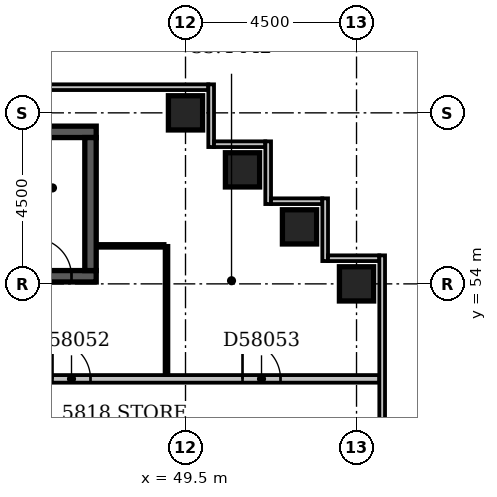
"""IFC4 building model, lengths in metres.
Left out: names, types, materials, properties, quantities, classifications, styles, units other than length and angle.
Written with IfcOpenShell. Run it as: python <this file> out.ifc"""

import sys

from ifc_helpers import new_model, si_unit, direction, frame, frame_2d, origin, origin_2d, place, context, subcontext, project, spatial, rectangle, extrude, element, fill, save


model = new_model("IFC4")
c1 = context("Model", 3, precision=1e-05, world=origin(), true_north=direction((0.0, 1.0)))
c2 = subcontext(c1, "Body", "Model", "MODEL_VIEW")
j1 = project(units=[si_unit("LENGTHUNIT", "METRE"), si_unit("PLANEANGLEUNIT", "RADIAN")], contexts=[c1])
p1 = place(None, origin())
s1 = spatial("IfcSite", under=j1, at=p1, CompositionType="ELEMENT")
p2 = place(p1, origin())
s2 = spatial("IfcBuilding", under=s1, at=p2, CompositionType="ELEMENT")
p3 = place(p2, frame((0.0, 0.0, 225.8)))
s3 = spatial("IfcBuildingStorey", under=s2, at=p3, CompositionType="ELEMENT", Elevation=225.8)
p4 = place(p3, frame((44.85, 54.2, -0.3), z_axis=(0.0, 0.0, 1.0), x_axis=(1.0, 0.0, 0.0)))
e1 = element("IfcWall", 1, at=p4, inside=s3, PredefinedType="SHEAR", context=c2, shape_type="SweptSolid", body=[
    extrude(rectangle(XDim=2.3, YDim=0.3, at=frame_2d((1.15, 0.0))), origin(), (0.0, 0.0, 1.0), 3.6),
])
p5 = place(p4, frame((0.65, 0.0, 0.3)))
e2 = element("IfcOpeningElement", 2, at=p5, cuts=e1, PredefinedType="OPENING", context=c2, shape_type="SweptSolid", body=[
    extrude(rectangle(XDim=1.0, YDim=2.1, at=frame_2d((0.5, 1.05))), frame((0.0, 0.162, 0.0), z_axis=(0.0, -1.0, 0.0), x_axis=(1.0, 0.0, 0.0)), (0.0, 0.0, 1.0), 0.324),
])
p6 = place(p3, frame((44.85, 58.0, -0.3), z_axis=(0.0, 0.0, 1.0), x_axis=(1.0, 0.0, 0.0)))
e3 = element("IfcWall", 3, at=p6, inside=s3, PredefinedType="SHEAR", context=c2, shape_type="SweptSolid", body=[
    extrude(rectangle(XDim=2.3, YDim=0.3, at=frame_2d((1.15, 0.0))), origin(), (0.0, 0.0, 1.0), 3.6),
])
p7 = place(p3, frame((47.0, 54.35, -0.3), z_axis=(0.0, 0.0, 1.0), x_axis=(0.0, 1.0, 0.0)))
e4 = element("IfcWall", 4, at=p7, inside=s3, PredefinedType="SHEAR", context=c2, shape_type="SweptSolid", body=[
    extrude(rectangle(XDim=3.5, YDim=0.3, at=frame_2d((1.75, 0.0))), origin(), (0.0, 0.0, 1.0), 3.6),
])
for number, where, z_axis, x_axis in (
    (5, (54.0, 54.0, -0.3), (0.0, 0.0, 1.0), (1.0, 0.0, 0.0)),
    (6, (52.5, 55.5, -0.3), (0.0, 0.0, 1.0), (1.0, 0.0, 0.0)),
    (7, (51.0, 57.0, -0.3), (0.0, 0.0, 1.0), (1.0, 0.0, 0.0)),
    (8, (49.5, 58.5, -0.3), (0.0, 0.0, 1.0), (1.0, 0.0, 0.0)),
):
    element("IfcColumn", number, at=place(p3, frame(where, z_axis=z_axis, x_axis=x_axis)), inside=s3, PredefinedType="COLUMN", context=c2, shape_type="SweptSolid", body=[
        extrude(rectangle(XDim=0.9, YDim=0.9, at=origin_2d()), origin(), (0.0, 0.0, 1.0), 3.6),
    ])
p8 = place(p3, frame((54.675, 39.9, 0.0), z_axis=(0.0, 0.0, 1.0), x_axis=(0.0, 1.0, 0.0)))
e9 = element("IfcWall", 9, at=p8, inside=s3, PredefinedType="STANDARD", context=c2, shape_type="SweptSolid", body=[
    extrude(rectangle(XDim=14.85, YDim=0.15, at=frame_2d((7.425, 0.0))), origin(), (0.0, 0.0, 1.0), 2.7),
])
p9 = place(p8, frame((6.15, 0.0, 0.6)))
e10 = element("IfcOpeningElement", 10, at=p9, cuts=e9, PredefinedType="OPENING", context=c2, shape_type="SweptSolid", body=[
    extrude(rectangle(XDim=2.4, YDim=1.8, at=frame_2d((1.2, 0.9))), frame((0.0, 0.087, 0.0), z_axis=(0.0, -1.0, 0.0), x_axis=(1.0, 0.0, 0.0)), (0.0, 0.0, 1.0), 0.174),
])
p10 = place(p3, frame((54.6, 54.675, 0.0), z_axis=(0.0, 0.0, 1.0), x_axis=(-1.0, 0.0, 0.0)))
e11 = element("IfcWall", 11, at=p10, inside=s3, PredefinedType="STANDARD", context=c2, shape_type="SweptSolid", body=[
    extrude(rectangle(XDim=1.35, YDim=0.15, at=frame_2d((0.675, 0.0))), origin(), (0.0, 0.0, 1.0), 2.7),
])
p11 = place(p3, frame((53.175, 54.6, 0.0), z_axis=(0.0, 0.0, 1.0), x_axis=(0.0, 1.0, 0.0)))
e12 = element("IfcWall", 12, at=p11, inside=s3, PredefinedType="STANDARD", context=c2, shape_type="SweptSolid", body=[
    extrude(rectangle(XDim=1.65, YDim=0.15, at=frame_2d((0.825, 0.0))), origin(), (0.0, 0.0, 1.0), 2.7),
])
p12 = place(p3, frame((53.1, 56.175, 0.0), z_axis=(0.0, 0.0, 1.0), x_axis=(-1.0, 0.0, 0.0)))
e13 = element("IfcWall", 13, at=p12, inside=s3, PredefinedType="STANDARD", context=c2, shape_type="SweptSolid", body=[
    extrude(rectangle(XDim=1.35, YDim=0.15, at=frame_2d((0.675, 0.0))), origin(), (0.0, 0.0, 1.0), 2.7),
])
p13 = place(p3, frame((51.675, 56.1, 0.0), z_axis=(0.0, 0.0, 1.0), x_axis=(0.0, 1.0, 0.0)))
e14 = element("IfcWall", 14, at=p13, inside=s3, PredefinedType="STANDARD", context=c2, shape_type="SweptSolid", body=[
    extrude(rectangle(XDim=1.65, YDim=0.15, at=frame_2d((0.825, 0.0))), origin(), (0.0, 0.0, 1.0), 2.7),
])
p14 = place(p3, frame((51.6, 57.675, 0.0), z_axis=(0.0, 0.0, 1.0), x_axis=(-1.0, 0.0, 0.0)))
e15 = element("IfcWall", 15, at=p14, inside=s3, PredefinedType="STANDARD", context=c2, shape_type="SweptSolid", body=[
    extrude(rectangle(XDim=1.35, YDim=0.15, at=frame_2d((0.675, 0.0))), origin(), (0.0, 0.0, 1.0), 2.7),
])
p15 = place(p3, frame((50.175, 57.6, 0.0), z_axis=(0.0, 0.0, 1.0), x_axis=(0.0, 1.0, 0.0)))
e16 = element("IfcWall", 16, at=p15, inside=s3, PredefinedType="STANDARD", context=c2, shape_type="SweptSolid", body=[
    extrude(rectangle(XDim=1.65, YDim=0.15, at=frame_2d((0.825, 0.0))), origin(), (0.0, 0.0, 1.0), 2.7),
])
p16 = place(p3, frame((50.1, 59.175, 0.0), z_axis=(0.0, 0.0, 1.0), x_axis=(-1.0, 0.0, 0.0)))
e17 = element("IfcWall", 17, at=p16, inside=s3, PredefinedType="STANDARD", context=c2, shape_type="SweptSolid", body=[
    extrude(rectangle(XDim=50.85, YDim=0.15, at=frame_2d((25.425, 0.0))), origin(), (0.0, 0.0, 1.0), 2.7),
])
p17 = place(p3, frame((44.1, 51.5, 0.0), z_axis=(0.0, 0.0, 1.0), x_axis=(1.0, 0.0, 0.0)))
e18 = element("IfcWall", 18, at=p17, inside=s3, PredefinedType="PARTITIONING", context=c2, shape_type="SweptSolid", body=[
    extrude(rectangle(XDim=10.5, YDim=0.2, at=frame_2d((5.25, 0.0))), origin(), (0.0, 0.0, 1.0), 3.3),
])
p18 = place(p17, frame((1.9, 0.0, 0.0)))
e19 = element("IfcOpeningElement", 19, at=p18, cuts=e18, PredefinedType="OPENING", context=c2, shape_type="SweptSolid", body=[
    extrude(rectangle(XDim=1.0, YDim=2.1, at=frame_2d((0.5, 1.05))), frame((0.0, 0.112, 0.0), z_axis=(0.0, -1.0, 0.0), x_axis=(1.0, 0.0, 0.0)), (0.0, 0.0, 1.0), 0.224),
])
p19 = place(p17, frame((6.9, 0.0, 0.0)))
e20 = element("IfcOpeningElement", 20, at=p19, cuts=e18, PredefinedType="OPENING", context=c2, shape_type="SweptSolid", body=[
    extrude(rectangle(XDim=1.0, YDim=2.1, at=frame_2d((0.5, 1.05))), frame((0.0, 0.112, 0.0), z_axis=(0.0, -1.0, 0.0), x_axis=(1.0, 0.0, 0.0)), (0.0, 0.0, 1.0), 0.224),
])
p20 = place(p3, frame((49.0, 51.6, 0.0), z_axis=(0.0, 0.0, 1.0), x_axis=(0.0, 1.0, 0.0)))
e21 = element("IfcWall", 21, at=p20, inside=s3, PredefinedType="PARTITIONING", context=c2, shape_type="SweptSolid", body=[
    extrude(rectangle(XDim=3.4, YDim=0.1, at=frame_2d((1.7, 0.0))), origin(), (0.0, 0.0, 1.0), 3.3),
])
p21 = place(p3, frame((47.15, 55.0, 0.0), z_axis=(0.0, 0.0, 1.0), x_axis=(1.0, 0.0, 0.0)))
e22 = element("IfcWall", 22, at=p21, inside=s3, PredefinedType="PARTITIONING", context=c2, shape_type="SweptSolid", body=[
    extrude(rectangle(XDim=1.8, YDim=0.1, at=frame_2d((0.9, 0.0))), origin(), (0.0, 0.0, 1.0), 3.3),
])
p22 = place(p5, origin())
e23 = element("IfcDoor", 23, at=p22, inside=s3, OperationType="SINGLE_SWING_LEFT", PredefinedType="DOOR", context=c2, shape_type="SweptSolid", body=[
    extrude(rectangle(XDim=1.0, YDim=2.1, at=frame_2d((0.5, 1.05))), frame((0.0, 0.025, 0.0), z_axis=(0.0, -1.0, 0.0), x_axis=(1.0, 0.0, 0.0)), (0.0, 0.0, 1.0), 0.05),
])
fill(e2, e23)
p23 = place(p18, origin())
e24 = element("IfcDoor", 24, at=p23, inside=s3, OperationType="SINGLE_SWING_LEFT", PredefinedType="DOOR", context=c2, shape_type="SweptSolid", body=[
    extrude(rectangle(XDim=1.0, YDim=2.1, at=frame_2d((0.5, 1.05))), frame((0.0, 0.025, 0.0), z_axis=(0.0, -1.0, 0.0), x_axis=(1.0, 0.0, 0.0)), (0.0, 0.0, 1.0), 0.05),
])
fill(e19, e24)
p24 = place(p19, origin())
e25 = element("IfcDoor", 25, at=p24, inside=s3, OperationType="SINGLE_SWING_LEFT", PredefinedType="DOOR", context=c2, shape_type="SweptSolid", body=[
    extrude(rectangle(XDim=1.0, YDim=2.1, at=frame_2d((0.5, 1.05))), frame((0.0, 0.025, 0.0), z_axis=(0.0, -1.0, 0.0), x_axis=(1.0, 0.0, 0.0)), (0.0, 0.0, 1.0), 0.05),
])
fill(e20, e25)
save(model, sys.argv[1])
